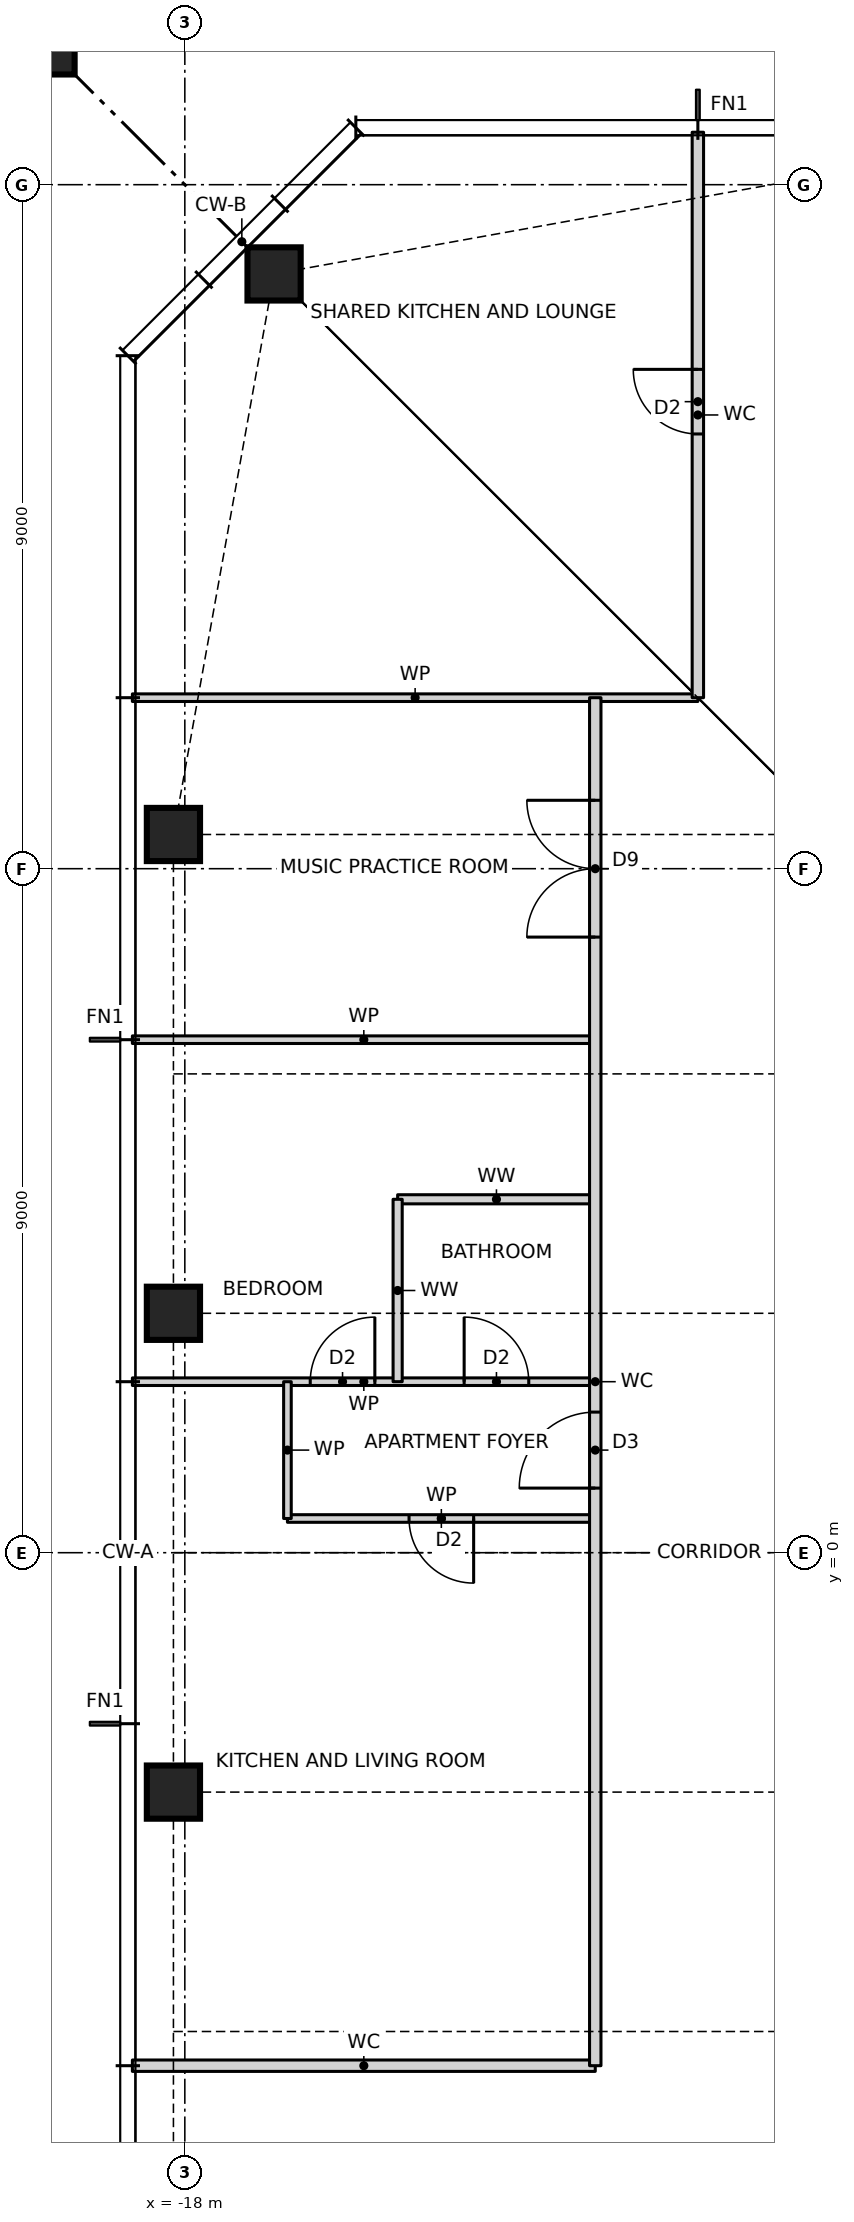
"""IFC4 building model, lengths in metres.
Left out: names, types, materials, properties, quantities, classifications, styles, units other than length and angle.
Written with IfcOpenShell. Run it as: python <this file> out.ifc"""

import sys

from ifc_helpers import new_model, si_unit, direction, frame, frame_2d, origin, origin_2d, place, context, subcontext, project, spatial, rectangle, hollow_rectangle, i_section, extrude, element, fill, save


model = new_model("IFC4")
c1 = context("Model", 3, precision=1e-05, world=origin(), true_north=direction((0.0, 1.0)))
c2 = subcontext(c1, "Body", "Model", "MODEL_VIEW")
j1 = project(units=[si_unit("LENGTHUNIT", "METRE"), si_unit("PLANEANGLEUNIT", "RADIAN")], contexts=[c1])
p1 = place(None, origin())
s1 = spatial("IfcSite", under=j1, at=p1, CompositionType="ELEMENT")
p2 = place(p1, origin())
s2 = spatial("IfcBuilding", under=s1, at=p2, CompositionType="ELEMENT")
p3 = place(p2, frame((0.0, 0.0, 188.0)))
s3 = spatial("IfcBuildingStorey", under=s2, at=p3, CompositionType="ELEMENT", Elevation=188.0)
for number, where, z_axis, x_axis in (
    (1, (-16.826, 16.826, 0.0), (0.0, 0.0, 1.0), (1.0, 0.0, 0.0)),
    (2, (-18.15, 9.45, 0.0), (0.0, 0.0, 1.0), (1.0, 0.0, 0.0)),
    (3, (-18.15, 3.15, 0.0), (0.0, 0.0, 1.0), (1.0, 0.0, 0.0)),
    (4, (-18.15, -3.15, 0.0), (0.0, 0.0, 1.0), (1.0, 0.0, 0.0)),
):
    element("IfcColumn", number, at=place(p3, frame(where, z_axis=z_axis, x_axis=x_axis)), inside=s3, PredefinedType="COLUMN", context=c2, shape_type="SweptSolid", body=[
        extrude(hollow_rectangle(XDim=0.7, YDim=0.7, WallThickness=0.06, at=origin_2d()), origin(), (0.0, 0.0, 1.0), 3.5),
    ])
p4 = place(p3, frame((-21.65, 21.65, 0.0), z_axis=(0.0, 0.0, 1.0), x_axis=(1.0, 0.0, 0.0)))
e5 = element("IfcColumn", 5, at=p4, inside=s3, PredefinedType="COLUMN", context=c2, shape_type="SweptSolid", body=[
    extrude(rectangle(XDim=4.4, YDim=4.4, at=origin_2d()), origin(), (0.0, 0.0, 1.0), 3.5),
    extrude(i_section(OverallWidth=0.478, OverallDepth=0.599, WebThickness=0.1, FlangeThickness=0.14, at=origin_2d()), origin(), (0.0, 0.0, 1.0), 3.5),
])
p5 = place(p3, frame((-18.69, -6.75, 0.0), z_axis=(0.0, 0.0, 1.0), x_axis=(1.0, 0.0, 0.0)))
e6 = element("IfcWall", 6, at=p5, inside=s3, PredefinedType="PARTITIONING", context=c2, shape_type="SweptSolid", body=[
    extrude(rectangle(XDim=6.09, YDim=0.15, at=frame_2d((3.045, 0.0))), origin(), (0.0, 0.0, 1.0), 3.27),
])
p6 = place(p3, frame((-16.65, 0.45, 0.0), z_axis=(0.0, 0.0, 1.0), x_axis=(1.0, 0.0, 0.0)))
e7 = element("IfcWall", 7, at=p6, inside=s3, PredefinedType="PARTITIONING", context=c2, shape_type="SweptSolid", body=[
    extrude(rectangle(XDim=4.05, YDim=0.1, at=frame_2d((2.025, 0.0))), origin(), (0.0, 0.0, 1.0), 3.27),
])
p7 = place(p6, frame((1.6, 0.0, 0.0)))
e8 = element("IfcOpeningElement", 8, at=p7, cuts=e7, PredefinedType="OPENING", context=c2, shape_type="SweptSolid", body=[
    extrude(rectangle(XDim=0.85, YDim=2.1, at=frame_2d((0.425, 1.05))), frame((0.0, 0.06, 0.0), z_axis=(0.0, -1.0, 0.0), x_axis=(1.0, 0.0, 0.0)), (0.0, 0.0, 1.0), 0.12),
])
p8 = place(p3, frame((-18.69, 2.25, 0.0), z_axis=(0.0, 0.0, 1.0), x_axis=(1.0, 0.0, 0.0)))
e9 = element("IfcWall", 9, at=p8, inside=s3, PredefinedType="PARTITIONING", context=c2, shape_type="SweptSolid", body=[
    extrude(rectangle(XDim=6.09, YDim=0.1, at=frame_2d((3.045, 0.0))), origin(), (0.0, 0.0, 1.0), 3.27),
])
p9 = place(p8, frame((2.34, 0.0, 0.0)))
e10 = element("IfcOpeningElement", 10, at=p9, cuts=e9, PredefinedType="OPENING", context=c2, shape_type="SweptSolid", body=[
    extrude(rectangle(XDim=0.85, YDim=2.1, at=frame_2d((0.425, 1.05))), frame((0.0, 0.06, 0.0), z_axis=(0.0, -1.0, 0.0), x_axis=(1.0, 0.0, 0.0)), (0.0, 0.0, 1.0), 0.12),
])
p10 = place(p8, frame((4.365, 0.0, 0.0)))
e11 = element("IfcOpeningElement", 11, at=p10, cuts=e9, PredefinedType="OPENING", context=c2, shape_type="SweptSolid", body=[
    extrude(rectangle(XDim=0.85, YDim=2.1, at=frame_2d((0.425, 1.05))), frame((0.0, 0.06, 0.0), z_axis=(0.0, -1.0, 0.0), x_axis=(1.0, 0.0, 0.0)), (0.0, 0.0, 1.0), 0.12),
])
p11 = place(p3, frame((-15.2, 4.65, 0.0), z_axis=(0.0, 0.0, 1.0), x_axis=(1.0, 0.0, 0.0)))
e12 = element("IfcWall", 12, at=p11, inside=s3, PredefinedType="PARTITIONING", context=c2, shape_type="SweptSolid", body=[
    extrude(rectangle(XDim=2.6, YDim=0.12, at=frame_2d((1.3, 0.0))), origin(), (0.0, 0.0, 1.0), 3.27),
])
p12 = place(p3, frame((-18.69, 6.75, 0.0), z_axis=(0.0, 0.0, 1.0), x_axis=(1.0, 0.0, 0.0)))
e13 = element("IfcWall", 13, at=p12, inside=s3, PredefinedType="PARTITIONING", context=c2, shape_type="SweptSolid", body=[
    extrude(rectangle(XDim=6.09, YDim=0.1, at=frame_2d((3.045, 0.0))), origin(), (0.0, 0.0, 1.0), 3.27),
])
p13 = place(p3, frame((-18.69, 11.25, 0.0), z_axis=(0.0, 0.0, 1.0), x_axis=(1.0, 0.0, 0.0)))
e14 = element("IfcWall", 14, at=p13, inside=s3, PredefinedType="PARTITIONING", context=c2, shape_type="SweptSolid", body=[
    extrude(rectangle(XDim=7.44, YDim=0.1, at=frame_2d((3.72, 0.0))), origin(), (0.0, 0.0, 1.0), 3.27),
])
p14 = place(p3, frame((-11.25, 11.25, 0.0), z_axis=(0.0, 0.0, 1.0), x_axis=(0.0, 1.0, 0.0)))
e15 = element("IfcWall", 15, at=p14, inside=s3, PredefinedType="PARTITIONING", context=c2, shape_type="SweptSolid", body=[
    extrude(rectangle(XDim=7.44, YDim=0.15, at=frame_2d((3.72, 0.0))), origin(), (0.0, 0.0, 1.0), 3.27),
])
p15 = place(p14, frame((3.47, 0.0, 0.0)))
e16 = element("IfcOpeningElement", 16, at=p15, cuts=e15, PredefinedType="OPENING", context=c2, shape_type="SweptSolid", body=[
    extrude(rectangle(XDim=0.85, YDim=2.1, at=frame_2d((0.425, 1.05))), frame((0.0, 0.085, 0.0), z_axis=(0.0, -1.0, 0.0), x_axis=(1.0, 0.0, 0.0)), (0.0, 0.0, 1.0), 0.17),
])
p16 = place(p3, frame((-12.6, -6.75, 0.0), z_axis=(0.0, 0.0, 1.0), x_axis=(0.0, 1.0, 0.0)))
e17 = element("IfcWall", 17, at=p16, inside=s3, PredefinedType="PARTITIONING", context=c2, shape_type="SweptSolid", body=[
    extrude(rectangle(XDim=18.0, YDim=0.15, at=frame_2d((9.0, 0.0))), origin(), (0.0, 0.0, 1.0), 3.27),
])
p17 = place(p16, frame((14.85, 0.0, 0.0)))
e18 = element("IfcOpeningElement", 18, at=p17, cuts=e17, PredefinedType="OPENING", context=c2, shape_type="SweptSolid", body=[
    extrude(rectangle(XDim=1.8, YDim=2.1, at=frame_2d((0.9, 1.05))), frame((0.0, 0.085, 0.0), z_axis=(0.0, -1.0, 0.0), x_axis=(1.0, 0.0, 0.0)), (0.0, 0.0, 1.0), 0.17),
])
p18 = place(p16, frame((7.6, 0.0, 0.0)))
e19 = element("IfcOpeningElement", 19, at=p18, cuts=e17, PredefinedType="OPENING", context=c2, shape_type="SweptSolid", body=[
    extrude(rectangle(XDim=1.0, YDim=2.1, at=frame_2d((0.5, 1.05))), frame((0.0, 0.085, 0.0), z_axis=(0.0, -1.0, 0.0), x_axis=(1.0, 0.0, 0.0)), (0.0, 0.0, 1.0), 0.17),
])
p19 = place(p3, frame((-15.2, 2.25, 0.0), z_axis=(0.0, 0.0, 1.0), x_axis=(0.0, 1.0, 0.0)))
e20 = element("IfcWall", 20, at=p19, inside=s3, PredefinedType="PARTITIONING", context=c2, shape_type="SweptSolid", body=[
    extrude(rectangle(XDim=2.4, YDim=0.12, at=frame_2d((1.2, 0.0))), origin(), (0.0, 0.0, 1.0), 3.27),
])
p20 = place(p3, frame((-16.65, 0.45, 0.0), z_axis=(0.0, 0.0, 1.0), x_axis=(0.0, 1.0, 0.0)))
e21 = element("IfcWall", 21, at=p20, inside=s3, PredefinedType="PARTITIONING", context=c2, shape_type="SweptSolid", body=[
    extrude(rectangle(XDim=1.8, YDim=0.1, at=frame_2d((0.9, 0.0))), origin(), (0.0, 0.0, 1.0), 3.27),
])
p21 = place(p17, origin())
e22 = element("IfcDoor", 22, at=p21, inside=s3, OperationType="DOUBLE_DOOR_SINGLE_SWING", PredefinedType="DOOR", context=c2, shape_type="SweptSolid", body=[
    extrude(rectangle(XDim=1.8, YDim=2.1, at=frame_2d((0.9, 1.05))), frame((0.0, 0.025, 0.0), z_axis=(0.0, -1.0, 0.0), x_axis=(1.0, 0.0, 0.0)), (0.0, 0.0, 1.0), 0.05),
])
fill(e18, e22)
p22 = place(p18, origin())
e23 = element("IfcDoor", 23, at=p22, inside=s3, OperationType="SINGLE_SWING_LEFT", PredefinedType="DOOR", context=c2, shape_type="SweptSolid", body=[
    extrude(rectangle(XDim=1.0, YDim=2.1, at=frame_2d((0.5, 1.05))), frame((0.0, 0.025, 0.0), z_axis=(0.0, -1.0, 0.0), x_axis=(1.0, 0.0, 0.0)), (0.0, 0.0, 1.0), 0.05),
])
fill(e19, e23)
p23 = place(p7, frame((0.85, 0.0, 0.0), z_axis=(0.0, 0.0, 1.0), x_axis=(-1.0, 0.0, 0.0)))
e24 = element("IfcDoor", 24, at=p23, inside=s3, OperationType="SINGLE_SWING_LEFT", PredefinedType="DOOR", context=c2, shape_type="SweptSolid", body=[
    extrude(rectangle(XDim=0.85, YDim=2.1, at=frame_2d((0.425, 1.05))), frame((0.0, 0.025, 0.0), z_axis=(0.0, -1.0, 0.0), x_axis=(1.0, 0.0, 0.0)), (0.0, 0.0, 1.0), 0.05),
])
fill(e8, e24)
p24 = place(p9, origin())
e25 = element("IfcDoor", 25, at=p24, inside=s3, OperationType="SINGLE_SWING_RIGHT", PredefinedType="DOOR", context=c2, shape_type="SweptSolid", body=[
    extrude(rectangle(XDim=0.85, YDim=2.1, at=frame_2d((0.425, 1.05))), frame((0.0, 0.025, 0.0), z_axis=(0.0, -1.0, 0.0), x_axis=(1.0, 0.0, 0.0)), (0.0, 0.0, 1.0), 0.05),
])
fill(e10, e25)
p25 = place(p10, origin())
e26 = element("IfcDoor", 26, at=p25, inside=s3, OperationType="SINGLE_SWING_LEFT", PredefinedType="DOOR", context=c2, shape_type="SweptSolid", body=[
    extrude(rectangle(XDim=0.85, YDim=2.1, at=frame_2d((0.425, 1.05))), frame((0.0, 0.025, 0.0), z_axis=(0.0, -1.0, 0.0), x_axis=(1.0, 0.0, 0.0)), (0.0, 0.0, 1.0), 0.05),
])
fill(e11, e26)
p26 = place(p15, origin())
e27 = element("IfcDoor", 27, at=p26, inside=s3, OperationType="SINGLE_SWING_RIGHT", PredefinedType="DOOR", context=c2, shape_type="SweptSolid", body=[
    extrude(rectangle(XDim=0.85, YDim=2.1, at=frame_2d((0.425, 1.05))), frame((0.0, 0.025, 0.0), z_axis=(0.0, -1.0, 0.0), x_axis=(1.0, 0.0, 0.0)), (0.0, 0.0, 1.0), 0.05),
])
fill(e16, e27)
save(model, sys.argv[1])
